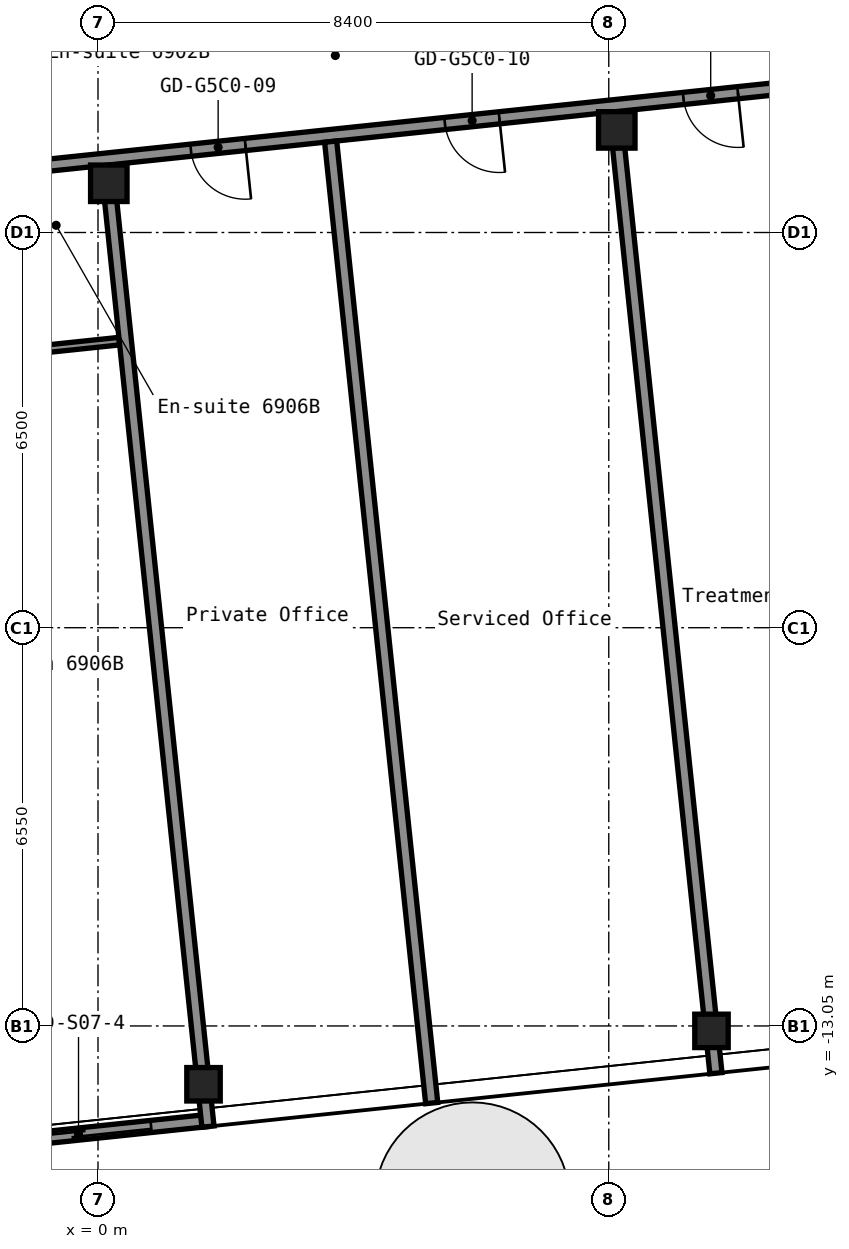
"""IFC4 building model, lengths in metres.
Left out: names, types, materials, properties, quantities, classifications, styles, units other than length and angle.
Written with IfcOpenShell. Run it as: python <this file> out.ifc"""

import sys

from ifc_helpers import new_model, si_unit, direction, frame, frame_2d, origin, origin_2d, place, context, subcontext, project, spatial, rectangle, hollow_rectangle, extrude, element, fill, save


model = new_model("IFC4")
c1 = context("Model", 3, precision=1e-05, world=origin(), true_north=direction((0.0, 1.0)))
c2 = subcontext(c1, "Body", "Model", "MODEL_VIEW")
j1 = project(units=[si_unit("LENGTHUNIT", "METRE"), si_unit("PLANEANGLEUNIT", "RADIAN")], contexts=[c1])
p1 = place(None, origin())
s1 = spatial("IfcSite", under=j1, at=p1, CompositionType="ELEMENT")
p2 = place(p1, origin())
s2 = spatial("IfcBuilding", under=s1, at=p2, CompositionType="ELEMENT")
p3 = place(p2, frame((0.0, 0.0, 245.4)))
s3 = spatial("IfcBuildingStorey", under=s2, at=p3, CompositionType="ELEMENT", Elevation=245.4)
p4 = place(p3, frame((1.735, -14.009, 0.0), z_axis=(0.0, 0.0, 1.0), x_axis=(1.0, 0.0, 0.0)))
e1 = element("IfcColumn", 1, at=p4, inside=s3, PredefinedType="COLUMN", context=c2, shape_type="SweptSolid", body=[
    extrude(hollow_rectangle(XDim=0.55, YDim=0.55, WallThickness=0.022, InnerFilletRadius=0.033, OuterFilletRadius=0.055, at=origin_2d()), origin(), (0.0, 0.0, 1.0), 2.75),
])
p5 = place(p3, frame((0.178, 0.809, 0.0), z_axis=(0.0, 0.0, 1.0), x_axis=(1.0, 0.0, 0.0)))
e2 = element("IfcColumn", 2, at=p5, inside=s3, PredefinedType="COLUMN", context=c2, shape_type="SweptSolid", body=[
    extrude(hollow_rectangle(XDim=0.6, YDim=0.6, WallThickness=0.025, InnerFilletRadius=0.038, OuterFilletRadius=0.062, at=origin_2d()), origin(), (0.0, 0.0, 1.0), 2.75),
])
p6 = place(p3, frame((10.089, -13.131, 0.0), z_axis=(0.0, 0.0, 1.0), x_axis=(1.0, 0.0, 0.0)))
e3 = element("IfcColumn", 3, at=p6, inside=s3, PredefinedType="COLUMN", context=c2, shape_type="SweptSolid", body=[
    extrude(hollow_rectangle(XDim=0.55, YDim=0.55, WallThickness=0.022, InnerFilletRadius=0.033, OuterFilletRadius=0.055, at=origin_2d()), origin(), (0.0, 0.0, 1.0), 2.75),
])
p7 = place(p3, frame((8.532, 1.688, 0.0), z_axis=(0.0, 0.0, 1.0), x_axis=(1.0, 0.0, 0.0)))
e4 = element("IfcColumn", 4, at=p7, inside=s3, PredefinedType="COLUMN", context=c2, shape_type="SweptSolid", body=[
    extrude(hollow_rectangle(XDim=0.6, YDim=0.6, WallThickness=0.025, InnerFilletRadius=0.038, OuterFilletRadius=0.062, at=origin_2d()), origin(), (0.0, 0.0, 1.0), 2.75),
])
p8 = place(p3, frame((-1.975, -2.031, 0.0), z_axis=(0.0, 0.0, 1.0), x_axis=(0.994519751088, 0.104548862722, 0.0)))
e5 = element("IfcWall", 5, at=p8, inside=s3, PredefinedType="PARTITIONING", context=c2, shape_type="SweptSolid", body=[
    extrude(rectangle(XDim=2.337, YDim=0.125, at=frame_2d((1.169, 0.0))), origin(), (0.0, 0.0, 1.0), 2.75),
])
p9 = place(p3, frame((-16.572, -0.549, 0.0), z_axis=(0.0, 0.0, 1.0), x_axis=(0.994521146831, 0.104535584879, 0.0)))
e6 = element("IfcWall", 6, at=p9, inside=s3, PredefinedType="PARTITIONING", context=c2, shape_type="SweptSolid", body=[
    extrude(rectangle(XDim=33.561, YDim=0.2, at=frame_2d((16.78, 0.0))), origin(), (0.0, 0.0, 1.0), 2.75),
])
p10 = place(p9, frame((4.2, 0.0, 0.0)))
e7 = element("IfcOpeningElement", 7, at=p10, cuts=e6, PredefinedType="OPENING", context=c2, shape_type="SweptSolid", body=[
    extrude(rectangle(XDim=1.6, YDim=2.1, at=frame_2d((0.8, 1.05))), frame((0.0, 0.11, 0.0), z_axis=(0.0, -1.0, 0.0), x_axis=(1.0, 0.0, 0.0)), (0.0, 0.0, 1.0), 0.22),
])
p11 = place(p9, frame((11.25, 0.0, 0.0)))
e8 = element("IfcOpeningElement", 8, at=p11, cuts=e6, PredefinedType="OPENING", context=c2, shape_type="SweptSolid", body=[
    extrude(rectangle(XDim=1.0, YDim=2.1, at=frame_2d((0.5, 1.05))), frame((0.0, 0.11, 0.0), z_axis=(0.0, -1.0, 0.0), x_axis=(1.0, 0.0, 0.0)), (0.0, 0.0, 1.0), 0.22),
])
p12 = place(p9, frame((12.95, 0.0, 0.0)))
e9 = element("IfcOpeningElement", 9, at=p12, cuts=e6, PredefinedType="OPENING", context=c2, shape_type="SweptSolid", body=[
    extrude(rectangle(XDim=1.0, YDim=2.1, at=frame_2d((0.5, 1.05))), frame((0.0, 0.11, 0.0), z_axis=(0.0, -1.0, 0.0), x_axis=(1.0, 0.0, 0.0)), (0.0, 0.0, 1.0), 0.22),
])
p13 = place(p9, frame((18.2, 0.0, 0.0)))
e10 = element("IfcOpeningElement", 10, at=p13, cuts=e6, PredefinedType="OPENING", context=c2, shape_type="SweptSolid", body=[
    extrude(rectangle(XDim=0.9, YDim=2.1, at=frame_2d((0.45, 1.05))), frame((0.0, 0.11, 0.0), z_axis=(0.0, -1.0, 0.0), x_axis=(1.0, 0.0, 0.0)), (0.0, 0.0, 1.0), 0.22),
])
p14 = place(p9, frame((22.4, 0.0, 0.0)))
e11 = element("IfcOpeningElement", 11, at=p14, cuts=e6, PredefinedType="OPENING", context=c2, shape_type="SweptSolid", body=[
    extrude(rectangle(XDim=0.9, YDim=2.1, at=frame_2d((0.45, 1.05))), frame((0.0, 0.11, 0.0), z_axis=(0.0, -1.0, 0.0), x_axis=(1.0, 0.0, 0.0)), (0.0, 0.0, 1.0), 0.22),
])
p15 = place(p9, frame((26.345, 0.0, 0.0)))
e12 = element("IfcOpeningElement", 12, at=p15, cuts=e6, PredefinedType="OPENING", context=c2, shape_type="SweptSolid", body=[
    extrude(rectangle(XDim=0.9, YDim=2.1, at=frame_2d((0.45, 1.05))), frame((0.0, 0.11, 0.0), z_axis=(0.0, -1.0, 0.0), x_axis=(1.0, 0.0, 0.0)), (0.0, 0.0, 1.0), 0.22),
])
p16 = place(p9, frame((30.545, 0.0, 0.0)))
e13 = element("IfcOpeningElement", 13, at=p16, cuts=e6, PredefinedType="OPENING", context=c2, shape_type="SweptSolid", body=[
    extrude(rectangle(XDim=0.9, YDim=2.1, at=frame_2d((0.45, 1.05))), frame((0.0, 0.11, 0.0), z_axis=(0.0, -1.0, 0.0), x_axis=(1.0, 0.0, 0.0)), (0.0, 0.0, 1.0), 0.22),
])
p17 = place(p3, frame((-16.805, 2.041, 0.0), z_axis=(0.0, 0.0, 1.0), x_axis=(0.994521146831, 0.104535584879, 0.0)))
e14 = element("IfcWall", 14, at=p17, inside=s3, PredefinedType="PARTITIONING", context=c2, shape_type="SweptSolid", body=[
    extrude(rectangle(XDim=33.561, YDim=0.2, at=frame_2d((16.78, 0.0))), origin(), (0.0, 0.0, 1.0), 2.75),
])
p18 = place(p17, frame((4.161, 0.0, 0.0)))
e15 = element("IfcOpeningElement", 15, at=p18, cuts=e14, PredefinedType="OPENING", context=c2, shape_type="SweptSolid", body=[
    extrude(rectangle(XDim=1.6, YDim=2.1, at=frame_2d((0.8, 1.05))), frame((0.0, 0.11, 0.0), z_axis=(0.0, -1.0, 0.0), x_axis=(1.0, 0.0, 0.0)), (0.0, 0.0, 1.0), 0.22),
])
p19 = place(p17, frame((11.211, 0.0, 0.0)))
e16 = element("IfcOpeningElement", 16, at=p19, cuts=e14, PredefinedType="OPENING", context=c2, shape_type="SweptSolid", body=[
    extrude(rectangle(XDim=1.0, YDim=2.1, at=frame_2d((0.5, 1.05))), frame((0.0, 0.11, 0.0), z_axis=(0.0, -1.0, 0.0), x_axis=(1.0, 0.0, 0.0)), (0.0, 0.0, 1.0), 0.22),
])
p20 = place(p17, frame((12.911, 0.0, 0.0)))
e17 = element("IfcOpeningElement", 17, at=p20, cuts=e14, PredefinedType="OPENING", context=c2, shape_type="SweptSolid", body=[
    extrude(rectangle(XDim=1.0, YDim=2.1, at=frame_2d((0.5, 1.05))), frame((0.0, 0.11, 0.0), z_axis=(0.0, -1.0, 0.0), x_axis=(1.0, 0.0, 0.0)), (0.0, 0.0, 1.0), 0.22),
])
p21 = place(p17, frame((18.241, 0.0, 0.0)))
e18 = element("IfcOpeningElement", 18, at=p21, cuts=e14, PredefinedType="OPENING", context=c2, shape_type="SweptSolid", body=[
    extrude(rectangle(XDim=0.9, YDim=2.1, at=frame_2d((0.45, 1.05))), frame((0.0, 0.11, 0.0), z_axis=(0.0, -1.0, 0.0), x_axis=(1.0, 0.0, 0.0)), (0.0, 0.0, 1.0), 0.22),
])
p22 = place(p17, frame((22.441, 0.0, 0.0)))
e19 = element("IfcOpeningElement", 19, at=p22, cuts=e14, PredefinedType="OPENING", context=c2, shape_type="SweptSolid", body=[
    extrude(rectangle(XDim=0.9, YDim=2.1, at=frame_2d((0.45, 1.05))), frame((0.0, 0.11, 0.0), z_axis=(0.0, -1.0, 0.0), x_axis=(1.0, 0.0, 0.0)), (0.0, 0.0, 1.0), 0.22),
])
p23 = place(p17, frame((29.361, 0.0, 0.0)))
e20 = element("IfcOpeningElement", 20, at=p23, cuts=e14, PredefinedType="OPENING", context=c2, shape_type="SweptSolid", body=[
    extrude(rectangle(XDim=1.6, YDim=2.1, at=frame_2d((0.8, 1.05))), frame((0.0, 0.11, 0.0), z_axis=(0.0, -1.0, 0.0), x_axis=(1.0, 0.0, 0.0)), (0.0, 0.0, 1.0), 0.22),
])
p24 = place(p3, frame((1.808, -14.705, 0.0), z_axis=(0.0, 0.0, 1.0), x_axis=(-0.104523729364, 0.99452239291, 0.0)))
e21 = element("IfcWall", 21, at=p24, inside=s3, PredefinedType="PARTITIONING", context=c2, shape_type="SweptSolid", body=[
    extrude(rectangle(XDim=15.308, YDim=0.2, at=frame_2d((7.654, 0.0))), origin(), (0.0, 0.0, 1.0), 2.75),
])
p25 = place(p3, frame((5.488, -14.318, 0.0), z_axis=(0.0, 0.0, 1.0), x_axis=(-0.104520927191, 0.994522687413, 0.0)))
e22 = element("IfcWall", 22, at=p25, inside=s3, PredefinedType="PARTITIONING", context=c2, shape_type="SweptSolid", body=[
    extrude(rectangle(XDim=15.9, YDim=0.2, at=frame_2d((7.95, 0.0))), origin(), (0.0, 0.0, 1.0), 2.75),
])
p26 = place(p3, frame((10.162, -13.827, 0.0), z_axis=(0.0, 0.0, 1.0), x_axis=(-0.104523729364, 0.99452239291, 0.0)))
e23 = element("IfcWall", 23, at=p26, inside=s3, PredefinedType="PARTITIONING", context=c2, shape_type="SweptSolid", body=[
    extrude(rectangle(XDim=15.308, YDim=0.2, at=frame_2d((7.654, 0.0))), origin(), (0.0, 0.0, 1.0), 2.75),
])
p27 = place(p3, frame((-2.419, -15.049, 0.0), z_axis=(0.0, 0.0, 1.0), x_axis=(0.994520974641, 0.104537223034, 0.0)))
p28 = place(p27, frame((0.91, 0.0, 0.0)))
p29 = place(p28, frame((2.4, 0.0, 0.0), z_axis=(0.0, 0.0, 1.0), x_axis=(-1.0, 0.0, 0.0)))
e24 = element("IfcDoor", 24, at=p29, inside=s3, OperationType="SLIDING_TO_LEFT", PredefinedType="DOOR", context=c2, shape_type="SweptSolid", body=[
    extrude(rectangle(XDim=2.4, YDim=2.2, at=frame_2d((1.2, 1.1))), frame((0.0, 0.025, 0.0), z_axis=(0.0, -1.0, 0.0), x_axis=(1.0, 0.0, 0.0)), (0.0, 0.0, 1.0), 0.05),
])
p30 = place(p13, origin())
e25 = element("IfcDoor", 25, at=p30, inside=s3, OperationType="SINGLE_SWING_RIGHT", PredefinedType="DOOR", context=c2, shape_type="SweptSolid", body=[
    extrude(rectangle(XDim=0.9, YDim=2.1, at=frame_2d((0.45, 1.05))), frame((0.0, 0.025, 0.0), z_axis=(0.0, -1.0, 0.0), x_axis=(1.0, 0.0, 0.0)), (0.0, 0.0, 1.0), 0.05),
])
fill(e10, e25)
p31 = place(p14, origin())
e26 = element("IfcDoor", 26, at=p31, inside=s3, OperationType="SINGLE_SWING_RIGHT", PredefinedType="DOOR", context=c2, shape_type="SweptSolid", body=[
    extrude(rectangle(XDim=0.9, YDim=2.1, at=frame_2d((0.45, 1.05))), frame((0.0, 0.025, 0.0), z_axis=(0.0, -1.0, 0.0), x_axis=(1.0, 0.0, 0.0)), (0.0, 0.0, 1.0), 0.05),
])
fill(e11, e26)
p32 = place(p15, origin())
e27 = element("IfcDoor", 27, at=p32, inside=s3, OperationType="SINGLE_SWING_RIGHT", PredefinedType="DOOR", context=c2, shape_type="SweptSolid", body=[
    extrude(rectangle(XDim=0.9, YDim=2.1, at=frame_2d((0.45, 1.05))), frame((0.0, 0.025, 0.0), z_axis=(0.0, -1.0, 0.0), x_axis=(1.0, 0.0, 0.0)), (0.0, 0.0, 1.0), 0.05),
])
fill(e12, e27)
save(model, sys.argv[1])
